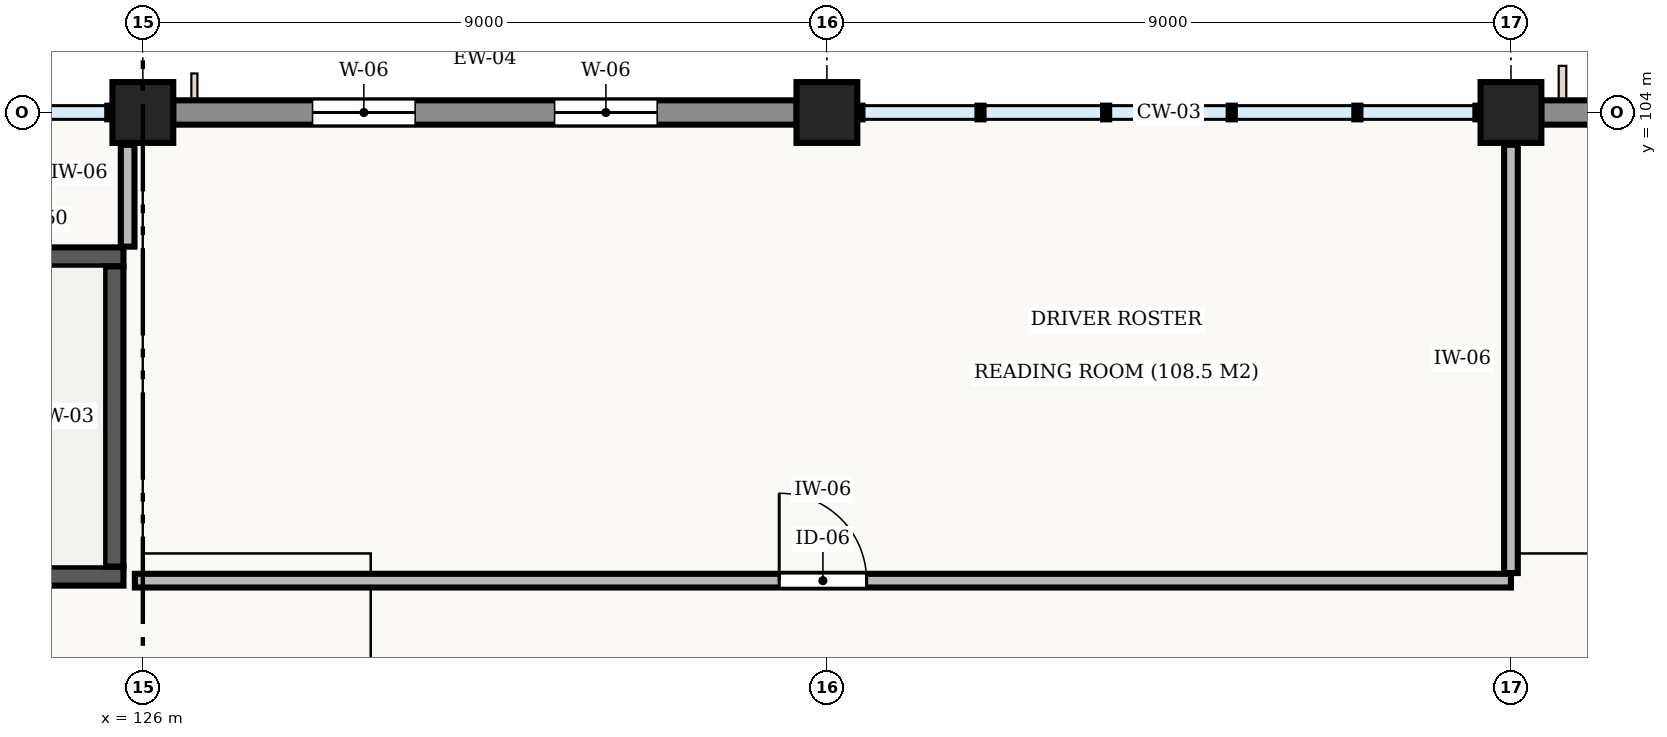
"""IFC4 building model, lengths in metres.
Left out: names, types, materials, properties, quantities, classifications, styles, units other than length and angle.
Written with IfcOpenShell. Run it as: python <this file> out.ifc"""

import sys

from ifc_helpers import new_model, si_unit, direction, frame, frame_2d, origin, origin_2d, place, context, subcontext, project, spatial, rectangle, extrude, element, fill, save


model = new_model("IFC4")
c1 = context("Model", 3, precision=1e-05, world=origin(), true_north=direction((0.0, 1.0)))
c2 = subcontext(c1, "Body", "Model", "MODEL_VIEW")
j1 = project(units=[si_unit("LENGTHUNIT", "METRE"), si_unit("PLANEANGLEUNIT", "RADIAN")], contexts=[c1])
p1 = place(None, origin())
s1 = spatial("IfcSite", under=j1, at=p1, CompositionType="ELEMENT")
p2 = place(p1, origin())
s2 = spatial("IfcBuilding", under=s1, at=p2, CompositionType="ELEMENT")
p3 = place(p2, frame((0.0, 0.0, 5.4)))
s3 = spatial("IfcBuildingStorey", under=s2, at=p3, CompositionType="ELEMENT", Elevation=5.4)
for number, where, z_axis, x_axis in (
    (1, (126.0, 104.0, 0.0), (0.0, 0.0, 1.0), (1.0, 0.0, 0.0)),
    (2, (135.0, 104.0, 0.0), (0.0, 0.0, 1.0), (1.0, 0.0, 0.0)),
    (3, (144.0, 104.0, 0.0), (0.0, 0.0, 1.0), (1.0, 0.0, 0.0)),
):
    element("IfcColumn", number, at=place(p3, frame(where, z_axis=z_axis, x_axis=x_axis)), inside=s3, PredefinedType="COLUMN", context=c2, shape_type="SweptSolid", body=[
        extrude(rectangle(XDim=0.8, YDim=0.8, at=origin_2d()), origin(), (0.0, 0.0, 1.0), 4.8),
    ])
p4 = place(p3, frame((126.398, 104.0, 0.0), z_axis=(0.0, 0.0, 1.0), x_axis=(1.0, 0.0, 0.0)))
e4 = element("IfcWall", 4, at=p4, inside=s3, PredefinedType="STANDARD", context=c2, shape_type="SweptSolid", body=[
    extrude(rectangle(XDim=8.204, YDim=0.32, at=frame_2d((4.102, 0.0))), origin(), (0.0, 0.0, 1.0), 3.86),
])
p5 = place(p4, frame((1.835, 0.0, 0.9)))
e5 = element("IfcOpeningElement", 5, at=p5, cuts=e4, PredefinedType="OPENING", context=c2, shape_type="SweptSolid", body=[
    extrude(rectangle(XDim=1.35, YDim=2.0, at=frame_2d((0.675, 1.0))), frame((0.0, 0.172, 0.0), z_axis=(0.0, -1.0, 0.0), x_axis=(1.0, 0.0, 0.0)), (0.0, 0.0, 1.0), 0.344),
])
p6 = place(p4, frame((5.019, 0.0, 0.9)))
e6 = element("IfcOpeningElement", 6, at=p6, cuts=e4, PredefinedType="OPENING", context=c2, shape_type="SweptSolid", body=[
    extrude(rectangle(XDim=1.35, YDim=2.0, at=frame_2d((0.675, 1.0))), frame((0.0, 0.172, 0.0), z_axis=(0.0, -1.0, 0.0), x_axis=(1.0, 0.0, 0.0)), (0.0, 0.0, 1.0), 0.344),
])
p7 = place(p3, frame((144.398, 104.0, 0.0), z_axis=(0.0, 0.0, 1.0), x_axis=(1.0, 0.0, 0.0)))
e7 = element("IfcWall", 7, at=p7, inside=s3, PredefinedType="STANDARD", context=c2, shape_type="SweptSolid", body=[
    extrude(rectangle(XDim=8.204, YDim=0.32, at=frame_2d((4.102, 0.0))), origin(), (0.0, 0.0, 1.0), 3.86),
])
p8 = place(p7, frame((1.935, 0.0, 0.9)))
e8 = element("IfcOpeningElement", 8, at=p8, cuts=e7, PredefinedType="OPENING", context=c2, shape_type="SweptSolid", body=[
    extrude(rectangle(XDim=1.2, YDim=1.8, at=frame_2d((0.6, 0.9))), frame((0.0, 0.172, 0.0), z_axis=(0.0, -1.0, 0.0), x_axis=(1.0, 0.0, 0.0)), (0.0, 0.0, 1.0), 0.344),
])
p9 = place(p7, frame((5.069, 0.0, 0.9)))
e9 = element("IfcOpeningElement", 9, at=p9, cuts=e7, PredefinedType="OPENING", context=c2, shape_type="SweptSolid", body=[
    extrude(rectangle(XDim=1.2, YDim=1.8, at=frame_2d((0.6, 0.9))), frame((0.0, 0.172, 0.0), z_axis=(0.0, -1.0, 0.0), x_axis=(1.0, 0.0, 0.0)), (0.0, 0.0, 1.0), 0.344),
])
p10 = place(p3, frame((117.255, 97.9, 0.0), z_axis=(0.0, 0.0, 1.0), x_axis=(1.0, 0.0, 0.0)))
e10 = element("IfcWall", 10, at=p10, inside=s3, PredefinedType="SHEAR", context=c2, shape_type="SweptSolid", body=[
    extrude(rectangle(XDim=8.49, YDim=0.25, at=frame_2d((4.245, 0.0))), origin(), (0.0, 0.0, 1.0), 4.48),
])
p11 = place(p10, frame((0.405, 0.0, 0.0)))
e11 = element("IfcOpeningElement", 11, at=p11, cuts=e10, PredefinedType="OPENING", context=c2, shape_type="SweptSolid", body=[
    extrude(rectangle(XDim=1.25, YDim=2.15, at=frame_2d((0.625, 1.075))), frame((0.0, 0.137, 0.0), z_axis=(0.0, -1.0, 0.0), x_axis=(1.0, 0.0, 0.0)), (0.0, 0.0, 1.0), 0.274),
])
p12 = place(p3, frame((125.745, 102.1, 0.0), z_axis=(0.0, 0.0, 1.0), x_axis=(-1.0, 0.0, 0.0)))
e12 = element("IfcWall", 12, at=p12, inside=s3, PredefinedType="SHEAR", context=c2, shape_type="SweptSolid", body=[
    extrude(rectangle(XDim=8.49, YDim=0.25, at=frame_2d((4.245, 0.0))), origin(), (0.0, 0.0, 1.0), 4.48),
])
p13 = place(p3, frame((125.62, 98.025, 0.0), z_axis=(0.0, 0.0, 1.0), x_axis=(0.0, 1.0, 0.0)))
e13 = element("IfcWall", 13, at=p13, inside=s3, PredefinedType="SHEAR", context=c2, shape_type="SweptSolid", body=[
    extrude(rectangle(XDim=3.95, YDim=0.25, at=frame_2d((1.975, 0.0))), origin(), (0.0, 0.0, 1.0), 4.48),
])
p14 = place(p3, frame((125.895, 97.84, 0.0), z_axis=(0.0, 0.0, 1.0), x_axis=(1.0, 0.0, 0.0)))
e14 = element("IfcWall", 14, at=p14, inside=s3, PredefinedType="STANDARD", context=c2, shape_type="SweptSolid", body=[
    extrude(rectangle(XDim=18.105, YDim=0.18, at=frame_2d((9.052, 0.0))), origin(), (0.0, 0.0, 1.0), 4.48),
])
p15 = place(p14, frame((8.478, 0.0, 0.0)))
e15 = element("IfcOpeningElement", 15, at=p15, cuts=e14, PredefinedType="OPENING", context=c2, shape_type="SweptSolid", body=[
    extrude(rectangle(XDim=1.15, YDim=2.15, at=frame_2d((0.575, 1.075))), frame((0.0, 0.102, 0.0), z_axis=(0.0, -1.0, 0.0), x_axis=(1.0, 0.0, 0.0)), (0.0, 0.0, 1.0), 0.204),
])
p16 = place(p3, frame((125.8, 102.235, 0.0), z_axis=(0.0, 0.0, 1.0), x_axis=(0.0, 1.0, 0.0)))
e16 = element("IfcWall", 16, at=p16, inside=s3, PredefinedType="STANDARD", context=c2, shape_type="SweptSolid", body=[
    extrude(rectangle(XDim=1.34, YDim=0.18, at=frame_2d((0.67, 0.0))), origin(), (0.0, 0.0, 1.0), 3.86),
])
p17 = place(p3, frame((144.0, 97.94, 0.0), z_axis=(0.0, 0.0, 1.0), x_axis=(0.0, 1.0, 0.0)))
e17 = element("IfcWall", 17, at=p17, inside=s3, PredefinedType="STANDARD", context=c2, shape_type="SweptSolid", body=[
    extrude(rectangle(XDim=5.635, YDim=0.18, at=frame_2d((2.817, 0.0))), origin(), (0.0, 0.0, 1.0), 3.86),
])
p18 = place(p5, origin())
e18 = element("IfcWindow", 18, at=p18, inside=s3, PartitioningType="SINGLE_PANEL", PredefinedType="WINDOW", context=c2, shape_type="SweptSolid", body=[
    extrude(rectangle(XDim=1.35, YDim=2.0, at=frame_2d((0.675, 1.0))), frame((0.0, 0.03, 0.0), z_axis=(0.0, -1.0, 0.0), x_axis=(1.0, 0.0, 0.0)), (0.0, 0.0, 1.0), 0.06),
])
fill(e5, e18)
p19 = place(p6, origin())
e19 = element("IfcWindow", 19, at=p19, inside=s3, PartitioningType="SINGLE_PANEL", PredefinedType="WINDOW", context=c2, shape_type="SweptSolid", body=[
    extrude(rectangle(XDim=1.35, YDim=2.0, at=frame_2d((0.675, 1.0))), frame((0.0, 0.03, 0.0), z_axis=(0.0, -1.0, 0.0), x_axis=(1.0, 0.0, 0.0)), (0.0, 0.0, 1.0), 0.06),
])
fill(e6, e19)
p20 = place(p15, origin())
e20 = element("IfcDoor", 20, at=p20, inside=s3, OperationType="SINGLE_SWING_LEFT", PredefinedType="DOOR", context=c2, shape_type="SweptSolid", body=[
    extrude(rectangle(XDim=1.15, YDim=2.15, at=frame_2d((0.575, 1.075))), frame((0.0, 0.025, 0.0), z_axis=(0.0, -1.0, 0.0), x_axis=(1.0, 0.0, 0.0)), (0.0, 0.0, 1.0), 0.05),
])
fill(e15, e20)
save(model, sys.argv[1])
